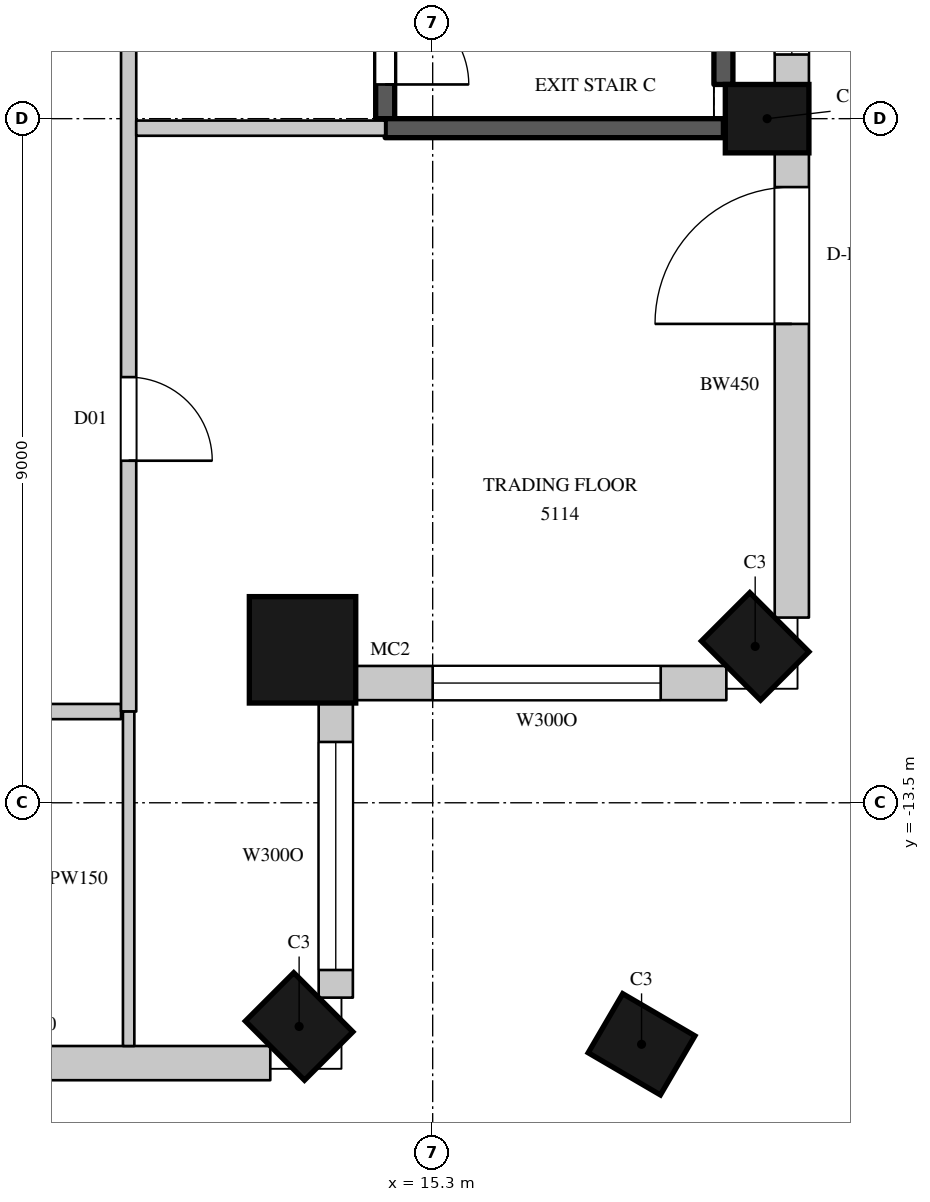
"""IFC4 building model, lengths in metres.
Left out: names, types, materials, properties, quantities, classifications, styles, units other than length and angle.
Written with IfcOpenShell. Run it as: python <this file> out.ifc"""

import sys

from ifc_helpers import new_model, si_unit, direction, frame, frame_2d, origin, origin_2d, place, context, subcontext, project, spatial, rectangle, circle, extrude, element, fill, save


model = new_model("IFC4")
c1 = context("Model", 3, precision=1e-05, world=origin(), true_north=direction((0.0, 1.0)))
c2 = subcontext(c1, "Body", "Model", "MODEL_VIEW")
j1 = project(units=[si_unit("LENGTHUNIT", "METRE"), si_unit("PLANEANGLEUNIT", "RADIAN")], contexts=[c1])
p1 = place(None, origin())
s1 = spatial("IfcSite", under=j1, at=p1, CompositionType="ELEMENT")
p2 = place(p1, origin())
s2 = spatial("IfcBuilding", under=s1, at=p2, CompositionType="ELEMENT")
p3 = place(p2, frame((0.0, 0.0, 230.2)))
s3 = spatial("IfcBuildingStorey", under=s2, at=p3, CompositionType="ELEMENT", Elevation=230.2)
p4 = place(p3, frame((13.543, -16.443, 0.0), z_axis=(0.0, 0.0, 1.0), x_axis=(0.707106781187, 0.707106781187, 0.0)))
e1 = element("IfcColumn", 1, at=p4, inside=s3, PredefinedType="COLUMN", context=c2, shape_type="SweptSolid", body=[
    extrude(rectangle(XDim=0.9, YDim=1.1, at=origin_2d()), origin(), (0.0, 0.0, 1.0), 4.1),
])
p5 = place(p3, frame((13.588, -11.488, 0.0), z_axis=(0.0, 0.0, 1.0), x_axis=(1.0, 0.0, 0.0)))
e2 = element("IfcColumn", 2, at=p5, inside=s3, PredefinedType="COLUMN", context=c2, shape_type="SweptSolid", body=[
    extrude(circle(Radius=0.7, at=origin_2d()), origin(), (0.0, 0.0, 1.0), 4.1),
])
for number, where, z_axis, x_axis in (
    (3, (19.543, -11.443, 0.0), (0.0, 0.0, 1.0), (0.707, 0.707, 0.0)),
    (4, (19.7, -4.5, 0.0), (0.0, 0.0, 1.0), (0.0, 1.0, 0.0)),
    (5, (18.048, -16.677, 0.0), (0.0, 0.0, 1.0), (0.504, 0.863, 0.0)),
):
    element("IfcColumn", number, at=place(p3, frame(where, z_axis=z_axis, x_axis=x_axis)), inside=s3, PredefinedType="COLUMN", context=c2, shape_type="SweptSolid", body=[
        extrude(rectangle(XDim=0.9, YDim=1.1, at=origin_2d()), origin(), (0.0, 0.0, 1.0), 4.1),
    ])
p6 = place(p3, frame((6.75, -16.925, 0.0), z_axis=(0.0, 0.0, 1.0), x_axis=(1.0, 0.0, 0.0)))
e6 = element("IfcWall", 6, at=p6, inside=s3, PredefinedType="SOLIDWALL", context=c2, shape_type="SweptSolid", body=[
    extrude(rectangle(XDim=6.414, YDim=0.45, at=frame_2d((3.207, 0.0))), origin(), (0.0, 0.0, 1.0), 3.8),
])
p7 = place(p6, frame((0.525, 0.0, 0.0)))
e7 = element("IfcOpeningElement", 7, at=p7, cuts=e6, PredefinedType="OPENING", context=c2, shape_type="SweptSolid", body=[
    extrude(rectangle(XDim=1.8, YDim=2.4, at=frame_2d((0.9, 1.2))), frame((0.0, 0.235, 0.0), z_axis=(0.0, -1.0, 0.0), x_axis=(1.0, 0.0, 0.0)), (0.0, 0.0, 1.0), 0.47),
])
p8 = place(p3, frame((14.025, -16.064, 0.0), z_axis=(0.0, 0.0, 1.0), x_axis=(0.0, 1.0, 0.0)))
e8 = element("IfcWall", 8, at=p8, inside=s3, PredefinedType="SOLIDWALL", context=c2, shape_type="SweptSolid", body=[
    extrude(rectangle(XDim=3.909, YDim=0.45, at=frame_2d((1.955, 0.0))), origin(), (0.0, 0.0, 1.0), 3.8),
])
p9 = place(p8, frame((0.364, 0.0, 1.05)))
e9 = element("IfcOpeningElement", 9, at=p9, cuts=e8, PredefinedType="OPENING", context=c2, shape_type="SweptSolid", body=[
    extrude(rectangle(XDim=3.0, YDim=2.4, at=frame_2d((1.5, 1.2))), frame((0.0, 0.235, 0.0), z_axis=(0.0, -1.0, 0.0), x_axis=(1.0, 0.0, 0.0)), (0.0, 0.0, 1.0), 0.47),
])
p10 = place(p3, frame((14.255, -11.925, 0.0), z_axis=(0.0, 0.0, 1.0), x_axis=(1.0, 0.0, 0.0)))
e10 = element("IfcWall", 10, at=p10, inside=s3, PredefinedType="SOLIDWALL", context=c2, shape_type="SweptSolid", body=[
    extrude(rectangle(XDim=4.909, YDim=0.45, at=frame_2d((2.455, 0.0))), origin(), (0.0, 0.0, 1.0), 3.8),
])
p11 = place(p10, frame((1.045, 0.0, 1.05)))
e11 = element("IfcOpeningElement", 11, at=p11, cuts=e10, PredefinedType="OPENING", context=c2, shape_type="SweptSolid", body=[
    extrude(rectangle(XDim=3.0, YDim=2.4, at=frame_2d((1.5, 1.2))), frame((0.0, 0.235, 0.0), z_axis=(0.0, -1.0, 0.0), x_axis=(1.0, 0.0, 0.0)), (0.0, 0.0, 1.0), 0.47),
])
p12 = place(p3, frame((20.025, -11.064, 0.0), z_axis=(0.0, 0.0, 1.0), x_axis=(0.0, 1.0, 0.0)))
e12 = element("IfcWall", 12, at=p12, inside=s3, PredefinedType="SOLIDWALL", context=c2, shape_type="SweptSolid", body=[
    extrude(rectangle(XDim=6.114, YDim=0.45, at=frame_2d((3.057, 0.0))), origin(), (0.0, 0.0, 1.0), 3.8),
])
p13 = place(p12, frame((3.864, 0.0, 0.0)))
e13 = element("IfcOpeningElement", 13, at=p13, cuts=e12, PredefinedType="OPENING", context=c2, shape_type="SweptSolid", body=[
    extrude(rectangle(XDim=1.8, YDim=2.4, at=frame_2d((0.9, 1.2))), frame((0.0, 0.235, 0.0), z_axis=(0.0, -1.0, 0.0), x_axis=(1.0, 0.0, 0.0)), (0.0, 0.0, 1.0), 0.47),
])
p14 = place(p3, frame((20.025, -4.05, 0.0), z_axis=(0.0, 0.0, 1.0), x_axis=(0.0, 1.0, 0.0)))
e14 = element("IfcWall", 14, at=p14, inside=s3, PredefinedType="SOLIDWALL", context=c2, shape_type="SweptSolid", body=[
    extrude(rectangle(XDim=8.439, YDim=0.45, at=frame_2d((4.219, 0.0))), origin(), (0.0, 0.0, 1.0), 3.8),
])
p15 = place(p14, frame((0.394, 0.0, 1.05)))
e15 = element("IfcOpeningElement", 15, at=p15, cuts=e14, PredefinedType="OPENING", context=c2, shape_type="SweptSolid", body=[
    extrude(rectangle(XDim=3.0, YDim=2.4, at=frame_2d((1.5, 1.2))), frame((0.0, 0.235, 0.0), z_axis=(0.0, -1.0, 0.0), x_axis=(1.0, 0.0, 0.0)), (0.0, 0.0, 1.0), 0.47),
])
p16 = place(p14, frame((5.082, 0.0, 1.05)))
e16 = element("IfcOpeningElement", 16, at=p16, cuts=e14, PredefinedType="OPENING", context=c2, shape_type="SweptSolid", body=[
    extrude(rectangle(XDim=3.0, YDim=2.4, at=frame_2d((1.5, 1.2))), frame((0.0, 0.235, 0.0), z_axis=(0.0, -1.0, 0.0), x_axis=(1.0, 0.0, 0.0)), (0.0, 0.0, 1.0), 0.47),
])
p17 = place(p3, frame((-10.9, -12.3, 0.0), z_axis=(0.0, 0.0, 1.0), x_axis=(1.0, 0.0, 0.0)))
e17 = element("IfcWall", 17, at=p17, inside=s3, PredefinedType="PARTITIONING", context=c2, shape_type="SweptSolid", body=[
    extrude(rectangle(XDim=22.1, YDim=0.2, at=frame_2d((11.05, 0.0))), origin(), (0.0, 0.0, 1.0), 3.8),
])
p18 = place(p17, frame((1.1, 0.0, 0.0)))
e18 = element("IfcOpeningElement", 18, at=p18, cuts=e17, PredefinedType="OPENING", context=c2, shape_type="SweptSolid", body=[
    extrude(rectangle(XDim=0.9, YDim=2.2, at=frame_2d((0.45, 1.1))), frame((0.0, 0.11, 0.0), z_axis=(0.0, -1.0, 0.0), x_axis=(1.0, 0.0, 0.0)), (0.0, 0.0, 1.0), 0.22),
])
p19 = place(p17, frame((4.9, 0.0, 0.0)))
e19 = element("IfcOpeningElement", 19, at=p19, cuts=e17, PredefinedType="OPENING", context=c2, shape_type="SweptSolid", body=[
    extrude(rectangle(XDim=0.9, YDim=2.2, at=frame_2d((0.45, 1.1))), frame((0.0, 0.11, 0.0), z_axis=(0.0, -1.0, 0.0), x_axis=(1.0, 0.0, 0.0)), (0.0, 0.0, 1.0), 0.22),
])
p20 = place(p17, frame((7.55, 0.0, 0.0)))
e20 = element("IfcOpeningElement", 20, at=p20, cuts=e17, PredefinedType="OPENING", context=c2, shape_type="SweptSolid", body=[
    extrude(rectangle(XDim=0.9, YDim=2.2, at=frame_2d((0.45, 1.1))), frame((0.0, 0.11, 0.0), z_axis=(0.0, -1.0, 0.0), x_axis=(1.0, 0.0, 0.0)), (0.0, 0.0, 1.0), 0.22),
])
p21 = place(p17, frame((9.95, 0.0, 0.0)))
e21 = element("IfcOpeningElement", 21, at=p21, cuts=e17, PredefinedType="OPENING", context=c2, shape_type="SweptSolid", body=[
    extrude(rectangle(XDim=1.1, YDim=2.4, at=frame_2d((0.55, 1.2))), frame((0.0, 0.11, 0.0), z_axis=(0.0, -1.0, 0.0), x_axis=(1.0, 0.0, 0.0)), (0.0, 0.0, 1.0), 0.22),
])
p22 = place(p17, frame((14.4, 0.0, 0.0)))
e22 = element("IfcOpeningElement", 22, at=p22, cuts=e17, PredefinedType="OPENING", context=c2, shape_type="SweptSolid", body=[
    extrude(rectangle(XDim=1.1, YDim=2.4, at=frame_2d((0.55, 1.2))), frame((0.0, 0.11, 0.0), z_axis=(0.0, -1.0, 0.0), x_axis=(1.0, 0.0, 0.0)), (0.0, 0.0, 1.0), 0.22),
])
p23 = place(p17, frame((17.95, 0.0, 0.0)))
e23 = element("IfcOpeningElement", 23, at=p23, cuts=e17, PredefinedType="OPENING", context=c2, shape_type="SweptSolid", body=[
    extrude(rectangle(XDim=1.1, YDim=2.4, at=frame_2d((0.55, 1.2))), frame((0.0, 0.11, 0.0), z_axis=(0.0, -1.0, 0.0), x_axis=(1.0, 0.0, 0.0)), (0.0, 0.0, 1.0), 0.22),
])
p24 = place(p3, frame((11.3, -12.3, 0.0), z_axis=(0.0, 0.0, 1.0), x_axis=(0.0, 1.0, 0.0)))
e24 = element("IfcWall", 24, at=p24, inside=s3, PredefinedType="PARTITIONING", context=c2, shape_type="SweptSolid", body=[
    extrude(rectangle(XDim=24.5, YDim=0.2, at=frame_2d((12.25, 0.0))), origin(), (0.0, 0.0, 1.0), 3.8),
])
p25 = place(p24, frame((10.15, 0.0, 0.0)))
e25 = element("IfcOpeningElement", 25, at=p25, cuts=e24, PredefinedType="OPENING", context=c2, shape_type="SweptSolid", body=[
    extrude(rectangle(XDim=1.5, YDim=2.4, at=frame_2d((0.75, 1.2))), frame((0.0, 0.11, 0.0), z_axis=(0.0, -1.0, 0.0), x_axis=(1.0, 0.0, 0.0)), (0.0, 0.0, 1.0), 0.22),
])
p26 = place(p24, frame((3.3, 0.0, 0.0)))
e26 = element("IfcOpeningElement", 26, at=p26, cuts=e24, PredefinedType="OPENING", context=c2, shape_type="SweptSolid", body=[
    extrude(rectangle(XDim=1.1, YDim=2.4, at=frame_2d((0.55, 1.2))), frame((0.0, 0.11, 0.0), z_axis=(0.0, -1.0, 0.0), x_axis=(1.0, 0.0, 0.0)), (0.0, 0.0, 1.0), 0.22),
])
p27 = place(p3, frame((11.4, -4.625, 0.0), z_axis=(0.0, 0.0, 1.0), x_axis=(1.0, 0.0, 0.0)))
e27 = element("IfcWall", 27, at=p27, inside=s3, PredefinedType="PARTITIONING", context=c2, shape_type="SweptSolid", body=[
    extrude(rectangle(XDim=3.275, YDim=0.2, at=frame_2d((1.638, 0.0))), origin(), (0.0, 0.0, 1.0), 3.8),
])
p28 = place(p3, frame((11.3, -16.7, 0.0), z_axis=(0.0, 0.0, 1.0), x_axis=(0.0, 1.0, 0.0)))
e28 = element("IfcWall", 28, at=p28, inside=s3, PredefinedType="PARTITIONING", context=c2, shape_type="SweptSolid", body=[
    extrude(rectangle(XDim=4.4, YDim=0.15, at=frame_2d((2.2, 0.0))), origin(), (0.0, 0.0, 1.0), 3.8),
])
p29 = place(p3, frame((14.675, -4.5, 0.0), z_axis=(0.0, 0.0, 1.0), x_axis=(0.0, 1.0, 0.0)))
e29 = element("IfcWall", 29, at=p29, inside=s3, PredefinedType="SHEAR", context=c2, shape_type="SweptSolid", body=[
    extrude(rectangle(XDim=9.0, YDim=0.25, at=frame_2d((4.5, 0.0))), origin(), (0.0, 0.0, 1.0), 3.8),
])
p30 = place(p29, frame((0.45, 0.0, 0.0)))
e30 = element("IfcOpeningElement", 30, at=p30, cuts=e29, PredefinedType="OPENING", context=c2, shape_type="SweptSolid", body=[
    extrude(rectangle(XDim=1.1, YDim=2.2, at=frame_2d((0.55, 1.1))), frame((0.0, 0.135, 0.0), z_axis=(0.0, -1.0, 0.0), x_axis=(1.0, 0.0, 0.0)), (0.0, 0.0, 1.0), 0.27),
])
p31 = place(p3, frame((14.675, -4.625, 0.0), z_axis=(0.0, 0.0, 1.0), x_axis=(1.0, 0.0, 0.0)))
e31 = element("IfcWall", 31, at=p31, inside=s3, PredefinedType="SHEAR", context=c2, shape_type="SweptSolid", body=[
    extrude(rectangle(XDim=4.45, YDim=0.25, at=frame_2d((2.225, 0.0))), origin(), (0.0, 0.0, 1.0), 3.8),
])
p32 = place(p3, frame((19.125, -4.05, 0.0), z_axis=(0.0, 0.0, 1.0), x_axis=(0.0, 1.0, 0.0)))
e32 = element("IfcWall", 32, at=p32, inside=s3, PredefinedType="SHEAR", context=c2, shape_type="SweptSolid", body=[
    extrude(rectangle(XDim=8.477, YDim=0.25, at=frame_2d((4.238, 0.0))), origin(), (0.0, 0.0, 1.0), 3.8),
])
p33 = place(p9, origin())
e33 = element("IfcWindow", 33, at=p33, inside=s3, PartitioningType="SINGLE_PANEL", PredefinedType="WINDOW", context=c2, shape_type="SweptSolid", body=[
    extrude(rectangle(XDim=3.0, YDim=2.4, at=frame_2d((1.5, 1.2))), frame((0.0, 0.135, 0.0), z_axis=(0.0, -1.0, 0.0), x_axis=(1.0, 0.0, 0.0)), (0.0, 0.0, 1.0), 0.06),
])
fill(e9, e33)
p34 = place(p11, origin())
e34 = element("IfcWindow", 34, at=p34, inside=s3, PartitioningType="SINGLE_PANEL", PredefinedType="WINDOW", context=c2, shape_type="SweptSolid", body=[
    extrude(rectangle(XDim=3.0, YDim=2.4, at=frame_2d((1.5, 1.2))), frame((0.0, 0.135, 0.0), z_axis=(0.0, -1.0, 0.0), x_axis=(1.0, 0.0, 0.0)), (0.0, 0.0, 1.0), 0.06),
])
fill(e11, e34)
p35 = place(p13, origin())
e35 = element("IfcDoor", 35, at=p35, inside=s3, OperationType="SLIDING_TO_LEFT", PredefinedType="DOOR", context=c2, shape_type="SweptSolid", body=[
    extrude(rectangle(XDim=1.8, YDim=2.4, at=frame_2d((0.9, 1.2))), frame((0.0, 0.13, 0.0), z_axis=(0.0, -1.0, 0.0), x_axis=(1.0, 0.0, 0.0)), (0.0, 0.0, 1.0), 0.05),
])
fill(e13, e35)
p36 = place(p15, origin())
e36 = element("IfcWindow", 36, at=p36, inside=s3, PartitioningType="SINGLE_PANEL", PredefinedType="WINDOW", context=c2, shape_type="SweptSolid", body=[
    extrude(rectangle(XDim=3.0, YDim=2.4, at=frame_2d((1.5, 1.2))), frame((0.0, 0.135, 0.0), z_axis=(0.0, -1.0, 0.0), x_axis=(1.0, 0.0, 0.0)), (0.0, 0.0, 1.0), 0.06),
])
fill(e15, e36)
p37 = place(p26, origin())
e37 = element("IfcDoor", 37, at=p37, inside=s3, OperationType="SINGLE_SWING_RIGHT", PredefinedType="DOOR", context=c2, shape_type="SweptSolid", body=[
    extrude(rectangle(XDim=1.1, YDim=2.4, at=frame_2d((0.55, 1.2))), frame((0.0, 0.025, 0.0), z_axis=(0.0, -1.0, 0.0), x_axis=(1.0, 0.0, 0.0)), (0.0, 0.0, 1.0), 0.05),
])
fill(e26, e37)
p38 = place(p30, origin())
e38 = element("IfcDoor", 38, at=p38, inside=s3, OperationType="SINGLE_SWING_RIGHT", PredefinedType="DOOR", context=c2, shape_type="SweptSolid", body=[
    extrude(rectangle(XDim=1.1, YDim=2.2, at=frame_2d((0.55, 1.1))), frame((0.0, 0.025, 0.0), z_axis=(0.0, -1.0, 0.0), x_axis=(1.0, 0.0, 0.0)), (0.0, 0.0, 1.0), 0.05),
])
fill(e30, e38)
save(model, sys.argv[1])
